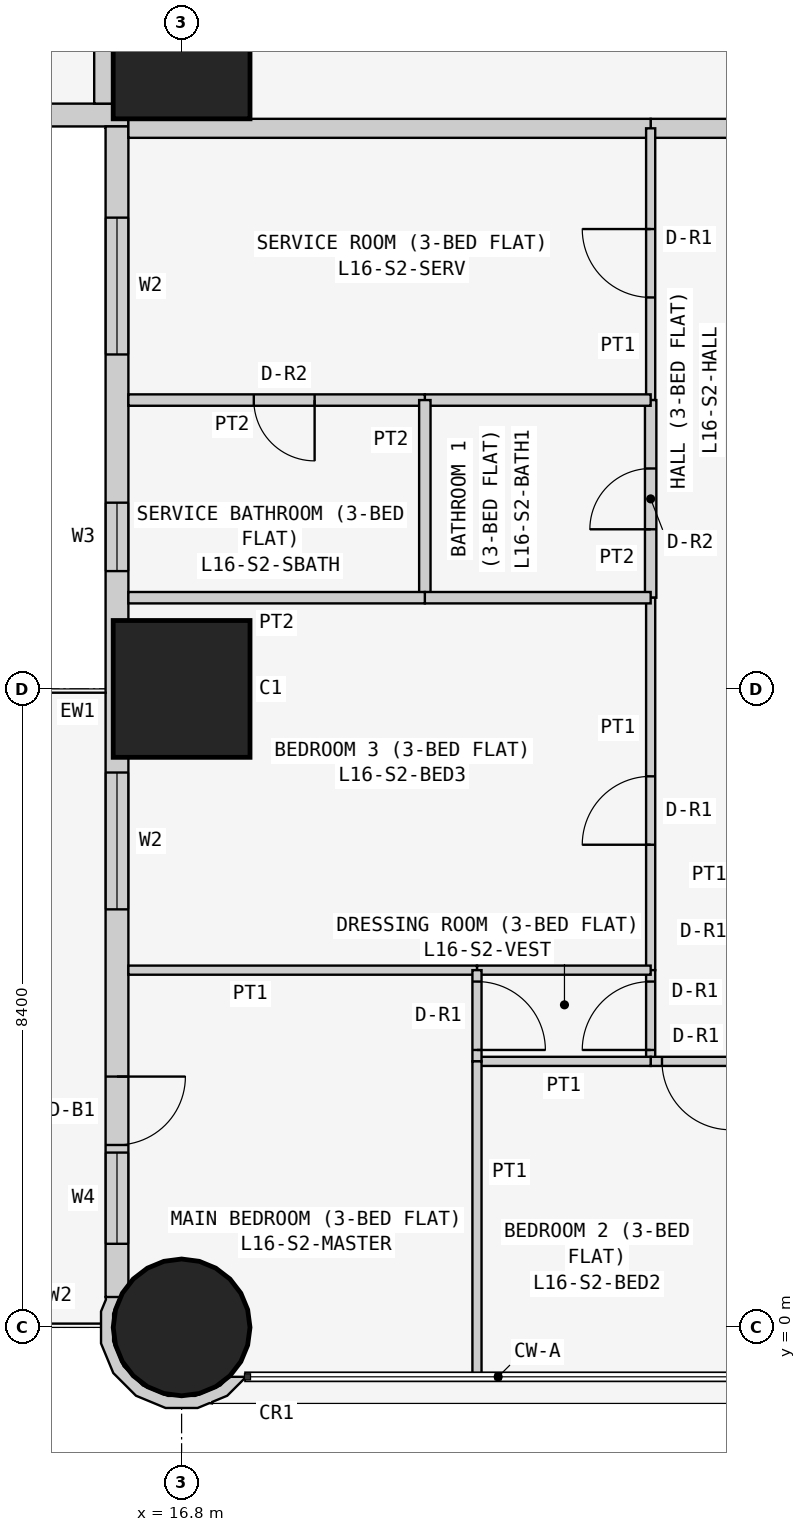
"""IFC4 building model, lengths in metres.
Left out: names, types, materials, properties, quantities, classifications, styles, units other than length and angle.
Written with IfcOpenShell. Run it as: python <this file> out.ifc"""

import sys

from ifc_helpers import new_model, si_unit, direction, frame, frame_2d, origin, origin_2d, place, context, subcontext, project, spatial, polyline, rectangle, circle, outline, extrude, element, fill, save


model = new_model("IFC4")
c1 = context("Model", 3, precision=1e-05, world=origin(), true_north=direction((0.0, 1.0)))
c2 = subcontext(c1, "Body", "Model", "MODEL_VIEW")
j1 = project(units=[si_unit("LENGTHUNIT", "METRE"), si_unit("PLANEANGLEUNIT", "RADIAN")], contexts=[c1])
p1 = place(None, origin())
s1 = spatial("IfcSite", under=j1, at=p1, CompositionType="ELEMENT")
p2 = place(p1, origin())
s2 = spatial("IfcBuilding", under=s1, at=p2, CompositionType="ELEMENT")
p3 = place(p2, frame((0.0, 0.0, 66.9)))
s3 = spatial("IfcBuildingStorey", under=s2, at=p3, CompositionType="ELEMENT", Elevation=66.9)
p4 = place(p3, frame((16.8, 0.0, 0.0), z_axis=(0.0, 0.0, 1.0), x_axis=(1.0, 0.0, 0.0)))
e1 = element("IfcColumn", 1, at=p4, inside=s3, PredefinedType="COLUMN", context=c2, shape_type="SweptSolid", body=[
    extrude(circle(Radius=0.9, at=origin_2d()), origin(), (0.0, 0.0, 1.0), 3.6),
])
for number, where, z_axis, x_axis in (
    (2, (16.8, 8.4, 0.0), (0.0, 0.0, 1.0), (1.0, 0.0, 0.0)),
    (3, (16.8, 16.8, 0.0), (0.0, 0.0, 1.0), (1.0, 0.0, 0.0)),
):
    element("IfcColumn", number, at=place(p3, frame(where, z_axis=z_axis, x_axis=x_axis)), inside=s3, PredefinedType="COLUMN", context=c2, shape_type="SweptSolid", body=[
        extrude(rectangle(XDim=1.8, YDim=1.8, at=origin_2d()), origin(), (0.0, 0.0, 1.0), 3.6),
    ])
p5 = place(p3, frame((0.4, 15.95, 0.0), z_axis=(0.0, 0.0, 1.0), x_axis=(1.0, 0.0, 0.0)))
e4 = element("IfcWall", 4, at=p5, inside=s3, PredefinedType="SOLIDWALL", context=c2, shape_type="SweptSolid", body=[
    extrude(rectangle(XDim=15.7, YDim=0.3, at=frame_2d((7.85, 0.0))), origin(), (0.0, 0.0, 1.0), 3.45),
])
p6 = place(p5, frame((12.4, 0.0, 0.9)))
e5 = element("IfcOpeningElement", 5, at=p6, cuts=e4, PredefinedType="OPENING", context=c2, shape_type="SweptSolid", body=[
    extrude(rectangle(XDim=1.8, YDim=1.5, at=frame_2d((0.9, 0.75))), frame((0.0, 0.16, 0.0), z_axis=(0.0, -1.0, 0.0), x_axis=(1.0, 0.0, 0.0)), (0.0, 0.0, 1.0), 0.32),
])
p7 = place(p5, frame((9.55, 0.0, 1.5)))
e6 = element("IfcOpeningElement", 6, at=p7, cuts=e4, PredefinedType="OPENING", context=c2, shape_type="SweptSolid", body=[
    extrude(rectangle(XDim=0.9, YDim=0.7, at=frame_2d((0.45, 0.35))), frame((0.0, 0.16, 0.0), z_axis=(0.0, -1.0, 0.0), x_axis=(1.0, 0.0, 0.0)), (0.0, 0.0, 1.0), 0.32),
])
p8 = place(p5, frame((5.1, 0.0, 0.9)))
e7 = element("IfcOpeningElement", 7, at=p8, cuts=e4, PredefinedType="OPENING", context=c2, shape_type="SweptSolid", body=[
    extrude(rectangle(XDim=1.8, YDim=1.5, at=frame_2d((0.9, 0.75))), frame((0.0, 0.16, 0.0), z_axis=(0.0, -1.0, 0.0), x_axis=(1.0, 0.0, 0.0)), (0.0, 0.0, 1.0), 0.32),
])
p9 = place(p5, frame((2.0, 0.0, 0.0)))
e8 = element("IfcOpeningElement", 8, at=p9, cuts=e4, PredefinedType="OPENING", context=c2, shape_type="SweptSolid", body=[
    extrude(rectangle(XDim=0.9, YDim=2.4, at=frame_2d((0.45, 1.2))), frame((0.0, 0.16, 0.0), z_axis=(0.0, -1.0, 0.0), x_axis=(1.0, 0.0, 0.0)), (0.0, 0.0, 1.0), 0.32),
])
p10 = place(p5, frame((0.7, 0.0, 0.9)))
e9 = element("IfcOpeningElement", 9, at=p10, cuts=e4, PredefinedType="OPENING", context=c2, shape_type="SweptSolid", body=[
    extrude(rectangle(XDim=1.2, YDim=1.5, at=frame_2d((0.6, 0.75))), frame((0.0, 0.16, 0.0), z_axis=(0.0, -1.0, 0.0), x_axis=(1.0, 0.0, 0.0)), (0.0, 0.0, 1.0), 0.32),
])
p11 = place(p3, frame((15.95, 15.8, 0.0), z_axis=(0.0, 0.0, 1.0), x_axis=(0.0, -1.0, 0.0)))
e10 = element("IfcWall", 10, at=p11, inside=s3, PredefinedType="SOLIDWALL", context=c2, shape_type="SweptSolid", body=[
    extrude(rectangle(XDim=15.4, YDim=0.3, at=frame_2d((7.7, 0.0))), origin(), (0.0, 0.0, 1.0), 3.45),
])
p12 = place(p11, frame((1.2, 0.0, 0.9)))
e11 = element("IfcOpeningElement", 11, at=p12, cuts=e10, PredefinedType="OPENING", context=c2, shape_type="SweptSolid", body=[
    extrude(rectangle(XDim=1.8, YDim=1.5, at=frame_2d((0.9, 0.75))), frame((0.0, 0.16, 0.0), z_axis=(0.0, -1.0, 0.0), x_axis=(1.0, 0.0, 0.0)), (0.0, 0.0, 1.0), 0.32),
])
p13 = place(p11, frame((4.95, 0.0, 1.5)))
e12 = element("IfcOpeningElement", 12, at=p13, cuts=e10, PredefinedType="OPENING", context=c2, shape_type="SweptSolid", body=[
    extrude(rectangle(XDim=0.9, YDim=0.7, at=frame_2d((0.45, 0.35))), frame((0.0, 0.16, 0.0), z_axis=(0.0, -1.0, 0.0), x_axis=(1.0, 0.0, 0.0)), (0.0, 0.0, 1.0), 0.32),
])
p14 = place(p11, frame((8.5, 0.0, 0.9)))
e13 = element("IfcOpeningElement", 13, at=p14, cuts=e10, PredefinedType="OPENING", context=c2, shape_type="SweptSolid", body=[
    extrude(rectangle(XDim=1.8, YDim=1.5, at=frame_2d((0.9, 0.75))), frame((0.0, 0.16, 0.0), z_axis=(0.0, -1.0, 0.0), x_axis=(1.0, 0.0, 0.0)), (0.0, 0.0, 1.0), 0.32),
])
p15 = place(p11, frame((12.5, 0.0, 0.0)))
e14 = element("IfcOpeningElement", 14, at=p15, cuts=e10, PredefinedType="OPENING", context=c2, shape_type="SweptSolid", body=[
    extrude(rectangle(XDim=0.9, YDim=2.4, at=frame_2d((0.45, 1.2))), frame((0.0, 0.16, 0.0), z_axis=(0.0, -1.0, 0.0), x_axis=(1.0, 0.0, 0.0)), (0.0, 0.0, 1.0), 0.32),
])
p16 = place(p11, frame((13.5, 0.0, 0.9)))
e15 = element("IfcOpeningElement", 15, at=p16, cuts=e10, PredefinedType="OPENING", context=c2, shape_type="SweptSolid", body=[
    extrude(rectangle(XDim=1.2, YDim=1.5, at=frame_2d((0.6, 0.75))), frame((0.0, 0.16, 0.0), z_axis=(0.0, -1.0, 0.0), x_axis=(1.0, 0.0, 0.0)), (0.0, 0.0, 1.0), 0.32),
])
p17 = place(p3, frame((15.89, 0.364, 0.0), z_axis=(0.0, 0.0, 1.0), x_axis=(-0.377204953059, -0.926129809145, 0.0)))
e16 = element("IfcWall", 16, at=p17, inside=s3, PredefinedType="SOLIDWALL", context=c2, shape_type="SweptSolid", body=[
    extrude(outline(polyline([(0.36, 1.803), (0.509, 1.741), (0.761, 1.486), (0.896, 1.154), (0.894, 0.795), (0.755, 0.465), (0.5, 0.213), (0.168, 0.078), (-0.1, 0.08), (0.001, -0.097), (0.03, -0.08), (0.199, -0.081), (0.589, 0.078), (0.889, 0.374), (1.053, 0.763), (1.055, 1.185), (0.896, 1.575), (0.778, 1.695), (0.769, 1.728), (0.75, 1.723), (0.6, 1.875), (0.295, 2.004), (0.281, 1.998), (0.36, 1.803)])), origin(), (0.0, 0.0, 1.0), 3.45),
])
p18 = place(p3, frame((24.171, 15.775, 0.0), z_axis=(0.0, 0.0, 1.0), x_axis=(-1.0, 0.0, 0.0)))
e17 = element("IfcWall", 17, at=p18, inside=s3, PredefinedType="PARTITIONING", context=c2, shape_type="SweptSolid", body=[
    extrude(rectangle(XDim=1.2, YDim=0.25, at=frame_2d((0.6, 0.0))), origin(), (0.0, 0.0, 1.0), 3.45),
])
p19 = place(p3, frame((22.971, 15.775, 0.0), z_axis=(0.0, 0.0, 1.0), x_axis=(-1.0, 0.0, 0.0)))
e18 = element("IfcWall", 18, at=p19, inside=s3, PredefinedType="PARTITIONING", context=c2, shape_type="SweptSolid", body=[
    extrude(rectangle(XDim=6.871, YDim=0.25, at=frame_2d((3.436, 0.0))), origin(), (0.0, 0.0, 1.0), 3.45),
])
p20 = place(p3, frame((15.775, 16.1, 0.0), z_axis=(0.0, 0.0, 1.0), x_axis=(0.0, 1.0, 0.0)))
e19 = element("IfcWall", 19, at=p20, inside=s3, PredefinedType="PARTITIONING", context=c2, shape_type="SweptSolid", body=[
    extrude(rectangle(XDim=6.471, YDim=0.25, at=frame_2d((3.235, 0.0))), origin(), (0.0, 0.0, 1.0), 3.45),
])
p21 = place(p3, frame((22.971, 12.2, 0.0), z_axis=(0.0, 0.0, 1.0), x_axis=(0.0, 1.0, 0.0)))
e20 = element("IfcWall", 20, at=p21, inside=s3, PredefinedType="PARTITIONING", context=c2, shape_type="SweptSolid", body=[
    extrude(rectangle(XDim=3.575, YDim=0.12, at=frame_2d((1.788, 0.0))), origin(), (0.0, 0.0, 1.0), 3.45),
])
p22 = place(p21, frame((1.35, 0.0, 0.0)))
e21 = element("IfcOpeningElement", 21, at=p22, cuts=e20, PredefinedType="OPENING", context=c2, shape_type="SweptSolid", body=[
    extrude(rectangle(XDim=0.9, YDim=2.1, at=frame_2d((0.45, 1.05))), frame((0.0, 0.07, 0.0), z_axis=(0.0, -1.0, 0.0), x_axis=(1.0, 0.0, 0.0)), (0.0, 0.0, 1.0), 0.14),
])
p23 = place(p3, frame((22.971, 9.6, 0.0), z_axis=(0.0, 0.0, 1.0), x_axis=(0.0, 1.0, 0.0)))
e22 = element("IfcWall", 22, at=p23, inside=s3, PredefinedType="PARTITIONING", context=c2, shape_type="SweptSolid", body=[
    extrude(rectangle(XDim=2.6, YDim=0.15, at=frame_2d((1.3, 0.0))), origin(), (0.0, 0.0, 1.0), 3.45),
])
p24 = place(p23, frame((0.9, 0.0, 0.0)))
e23 = element("IfcOpeningElement", 23, at=p24, cuts=e22, PredefinedType="OPENING", context=c2, shape_type="SweptSolid", body=[
    extrude(rectangle(XDim=0.8, YDim=2.1, at=frame_2d((0.4, 1.05))), frame((0.0, 0.085, 0.0), z_axis=(0.0, -1.0, 0.0), x_axis=(1.0, 0.0, 0.0)), (0.0, 0.0, 1.0), 0.17),
])
p25 = place(p3, frame((22.971, 4.7, 0.0), z_axis=(0.0, 0.0, 1.0), x_axis=(0.0, 1.0, 0.0)))
e24 = element("IfcWall", 24, at=p25, inside=s3, PredefinedType="PARTITIONING", context=c2, shape_type="SweptSolid", body=[
    extrude(rectangle(XDim=4.9, YDim=0.12, at=frame_2d((2.45, 0.0))), origin(), (0.0, 0.0, 1.0), 3.45),
])
p26 = place(p25, frame((1.65, 0.0, 0.0)))
e25 = element("IfcOpeningElement", 25, at=p26, cuts=e24, PredefinedType="OPENING", context=c2, shape_type="SweptSolid", body=[
    extrude(rectangle(XDim=0.9, YDim=2.1, at=frame_2d((0.45, 1.05))), frame((0.0, 0.07, 0.0), z_axis=(0.0, -1.0, 0.0), x_axis=(1.0, 0.0, 0.0)), (0.0, 0.0, 1.0), 0.14),
])
p27 = place(p3, frame((22.971, 3.5, 0.0), z_axis=(0.0, 0.0, 1.0), x_axis=(0.0, 1.0, 0.0)))
e26 = element("IfcWall", 26, at=p27, inside=s3, PredefinedType="PARTITIONING", context=c2, shape_type="SweptSolid", body=[
    extrude(rectangle(XDim=1.2, YDim=0.12, at=frame_2d((0.6, 0.0))), origin(), (0.0, 0.0, 1.0), 3.45),
])
p28 = place(p27, frame((0.15, 0.0, 0.0)))
e27 = element("IfcOpeningElement", 27, at=p28, cuts=e26, PredefinedType="OPENING", context=c2, shape_type="SweptSolid", body=[
    extrude(rectangle(XDim=0.9, YDim=2.1, at=frame_2d((0.45, 1.05))), frame((0.0, 0.07, 0.0), z_axis=(0.0, -1.0, 0.0), x_axis=(1.0, 0.0, 0.0)), (0.0, 0.0, 1.0), 0.14),
])
p29 = place(p3, frame((24.171, 3.5, 0.0), z_axis=(0.0, 0.0, 1.0), x_axis=(-1.0, 0.0, 0.0)))
e28 = element("IfcWall", 28, at=p29, inside=s3, PredefinedType="PARTITIONING", context=c2, shape_type="SweptSolid", body=[
    extrude(rectangle(XDim=1.2, YDim=0.12, at=frame_2d((0.6, 0.0))), origin(), (0.0, 0.0, 1.0), 3.45),
])
p30 = place(p29, frame((0.151, 0.0, 0.0)))
e29 = element("IfcOpeningElement", 29, at=p30, cuts=e28, PredefinedType="OPENING", context=c2, shape_type="SweptSolid", body=[
    extrude(rectangle(XDim=0.9, YDim=2.1, at=frame_2d((0.45, 1.05))), frame((0.0, 0.07, 0.0), z_axis=(0.0, -1.0, 0.0), x_axis=(1.0, 0.0, 0.0)), (0.0, 0.0, 1.0), 0.14),
])
p31 = place(p3, frame((22.971, 12.2, 0.0), z_axis=(0.0, 0.0, 1.0), x_axis=(-1.0, 0.0, 0.0)))
e30 = element("IfcWall", 30, at=p31, inside=s3, PredefinedType="PARTITIONING", context=c2, shape_type="SweptSolid", body=[
    extrude(rectangle(XDim=2.971, YDim=0.15, at=frame_2d((1.485, 0.0))), origin(), (0.0, 0.0, 1.0), 3.45),
])
p32 = place(p3, frame((20.0, 12.2, 0.0), z_axis=(0.0, 0.0, 1.0), x_axis=(-1.0, 0.0, 0.0)))
e31 = element("IfcWall", 31, at=p32, inside=s3, PredefinedType="PARTITIONING", context=c2, shape_type="SweptSolid", body=[
    extrude(rectangle(XDim=3.9, YDim=0.15, at=frame_2d((1.95, 0.0))), origin(), (0.0, 0.0, 1.0), 3.45),
])
p33 = place(p32, frame((1.45, 0.0, 0.0)))
e32 = element("IfcOpeningElement", 32, at=p33, cuts=e31, PredefinedType="OPENING", context=c2, shape_type="SweptSolid", body=[
    extrude(rectangle(XDim=0.8, YDim=2.1, at=frame_2d((0.4, 1.05))), frame((0.0, 0.085, 0.0), z_axis=(0.0, -1.0, 0.0), x_axis=(1.0, 0.0, 0.0)), (0.0, 0.0, 1.0), 0.17),
])
p34 = place(p3, frame((20.0, 9.6, 0.0), z_axis=(0.0, 0.0, 1.0), x_axis=(0.0, 1.0, 0.0)))
e33 = element("IfcWall", 33, at=p34, inside=s3, PredefinedType="PARTITIONING", context=c2, shape_type="SweptSolid", body=[
    extrude(rectangle(XDim=2.6, YDim=0.15, at=frame_2d((1.3, 0.0))), origin(), (0.0, 0.0, 1.0), 3.45),
])
p35 = place(p3, frame((22.971, 9.6, 0.0), z_axis=(0.0, 0.0, 1.0), x_axis=(-1.0, 0.0, 0.0)))
e34 = element("IfcWall", 34, at=p35, inside=s3, PredefinedType="PARTITIONING", context=c2, shape_type="SweptSolid", body=[
    extrude(rectangle(XDim=2.971, YDim=0.15, at=frame_2d((1.485, 0.0))), origin(), (0.0, 0.0, 1.0), 3.45),
])
p36 = place(p3, frame((20.0, 9.6, 0.0), z_axis=(0.0, 0.0, 1.0), x_axis=(-1.0, 0.0, 0.0)))
e35 = element("IfcWall", 35, at=p36, inside=s3, PredefinedType="PARTITIONING", context=c2, shape_type="SweptSolid", body=[
    extrude(rectangle(XDim=3.9, YDim=0.15, at=frame_2d((1.95, 0.0))), origin(), (0.0, 0.0, 1.0), 3.45),
])
p37 = place(p3, frame((22.971, 4.7, 0.0), z_axis=(0.0, 0.0, 1.0), x_axis=(-1.0, 0.0, 0.0)))
e36 = element("IfcWall", 36, at=p37, inside=s3, PredefinedType="PARTITIONING", context=c2, shape_type="SweptSolid", body=[
    extrude(rectangle(XDim=2.285, YDim=0.12, at=frame_2d((1.143, 0.0))), origin(), (0.0, 0.0, 1.0), 3.45),
])
p38 = place(p3, frame((20.686, 4.7, 0.0), z_axis=(0.0, 0.0, 1.0), x_axis=(-1.0, 0.0, 0.0)))
e37 = element("IfcWall", 37, at=p38, inside=s3, PredefinedType="PARTITIONING", context=c2, shape_type="SweptSolid", body=[
    extrude(rectangle(XDim=4.586, YDim=0.12, at=frame_2d((2.293, 0.0))), origin(), (0.0, 0.0, 1.0), 3.45),
])
p39 = place(p3, frame((22.971, 3.5, 0.0), z_axis=(0.0, 0.0, 1.0), x_axis=(-1.0, 0.0, 0.0)))
e38 = element("IfcWall", 38, at=p39, inside=s3, PredefinedType="PARTITIONING", context=c2, shape_type="SweptSolid", body=[
    extrude(rectangle(XDim=2.285, YDim=0.12, at=frame_2d((1.143, 0.0))), origin(), (0.0, 0.0, 1.0), 3.45),
])
p40 = place(p3, frame((20.686, 3.5, 0.0), z_axis=(0.0, 0.0, 1.0), x_axis=(0.0, 1.0, 0.0)))
e39 = element("IfcWall", 39, at=p40, inside=s3, PredefinedType="PARTITIONING", context=c2, shape_type="SweptSolid", body=[
    extrude(rectangle(XDim=1.2, YDim=0.12, at=frame_2d((0.6, 0.0))), origin(), (0.0, 0.0, 1.0), 3.45),
])
p41 = place(p40, frame((0.15, 0.0, 0.0)))
e40 = element("IfcOpeningElement", 40, at=p41, cuts=e39, PredefinedType="OPENING", context=c2, shape_type="SweptSolid", body=[
    extrude(rectangle(XDim=0.9, YDim=2.1, at=frame_2d((0.45, 1.05))), frame((0.0, 0.07, 0.0), z_axis=(0.0, -1.0, 0.0), x_axis=(1.0, 0.0, 0.0)), (0.0, 0.0, 1.0), 0.14),
])
p42 = place(p3, frame((20.686, -0.65, 0.0), z_axis=(0.0, 0.0, 1.0), x_axis=(0.0, 1.0, 0.0)))
e41 = element("IfcWall", 41, at=p42, inside=s3, PredefinedType="PARTITIONING", context=c2, shape_type="SweptSolid", body=[
    extrude(rectangle(XDim=4.15, YDim=0.12, at=frame_2d((2.075, 0.0))), origin(), (0.0, 0.0, 1.0), 3.45),
])
p43 = place(p12, origin())
e42 = element("IfcWindow", 42, at=p43, inside=s3, PartitioningType="SINGLE_PANEL", PredefinedType="WINDOW", context=c2, shape_type="SweptSolid", body=[
    extrude(rectangle(XDim=1.8, YDim=1.5, at=frame_2d((0.9, 0.75))), frame((0.0, 0.03, 0.0), z_axis=(0.0, -1.0, 0.0), x_axis=(1.0, 0.0, 0.0)), (0.0, 0.0, 1.0), 0.06),
])
fill(e11, e42)
p44 = place(p13, origin())
e43 = element("IfcWindow", 43, at=p44, inside=s3, PartitioningType="SINGLE_PANEL", PredefinedType="WINDOW", context=c2, shape_type="SweptSolid", body=[
    extrude(rectangle(XDim=0.9, YDim=0.7, at=frame_2d((0.45, 0.35))), frame((0.0, 0.03, 0.0), z_axis=(0.0, -1.0, 0.0), x_axis=(1.0, 0.0, 0.0)), (0.0, 0.0, 1.0), 0.06),
])
fill(e12, e43)
p45 = place(p14, origin())
e44 = element("IfcWindow", 44, at=p45, inside=s3, PartitioningType="SINGLE_PANEL", PredefinedType="WINDOW", context=c2, shape_type="SweptSolid", body=[
    extrude(rectangle(XDim=1.8, YDim=1.5, at=frame_2d((0.9, 0.75))), frame((0.0, 0.03, 0.0), z_axis=(0.0, -1.0, 0.0), x_axis=(1.0, 0.0, 0.0)), (0.0, 0.0, 1.0), 0.06),
])
fill(e13, e44)
p46 = place(p15, origin())
e45 = element("IfcDoor", 45, at=p46, inside=s3, OperationType="SINGLE_SWING_LEFT", PredefinedType="DOOR", context=c2, shape_type="SweptSolid", body=[
    extrude(rectangle(XDim=0.9, YDim=2.4, at=frame_2d((0.45, 1.2))), frame((0.0, 0.025, 0.0), z_axis=(0.0, -1.0, 0.0), x_axis=(1.0, 0.0, 0.0)), (0.0, 0.0, 1.0), 0.05),
])
fill(e14, e45)
p47 = place(p16, origin())
e46 = element("IfcWindow", 46, at=p47, inside=s3, PartitioningType="SINGLE_PANEL", PredefinedType="WINDOW", context=c2, shape_type="SweptSolid", body=[
    extrude(rectangle(XDim=1.2, YDim=1.5, at=frame_2d((0.6, 0.75))), frame((0.0, 0.03, 0.0), z_axis=(0.0, -1.0, 0.0), x_axis=(1.0, 0.0, 0.0)), (0.0, 0.0, 1.0), 0.06),
])
fill(e15, e46)
p48 = place(p22, origin())
e47 = element("IfcDoor", 47, at=p48, inside=s3, OperationType="SINGLE_SWING_RIGHT", PredefinedType="DOOR", context=c2, shape_type="SweptSolid", body=[
    extrude(rectangle(XDim=0.9, YDim=2.1, at=frame_2d((0.45, 1.05))), frame((0.0, 0.025, 0.0), z_axis=(0.0, -1.0, 0.0), x_axis=(1.0, 0.0, 0.0)), (0.0, 0.0, 1.0), 0.05),
])
fill(e21, e47)
p49 = place(p33, origin())
e48 = element("IfcDoor", 48, at=p49, inside=s3, OperationType="SINGLE_SWING_LEFT", PredefinedType="DOOR", context=c2, shape_type="SweptSolid", body=[
    extrude(rectangle(XDim=0.8, YDim=2.1, at=frame_2d((0.4, 1.05))), frame((0.0, 0.025, 0.0), z_axis=(0.0, -1.0, 0.0), x_axis=(1.0, 0.0, 0.0)), (0.0, 0.0, 1.0), 0.05),
])
fill(e32, e48)
p50 = place(p24, origin())
e49 = element("IfcDoor", 49, at=p50, inside=s3, OperationType="SINGLE_SWING_LEFT", PredefinedType="DOOR", context=c2, shape_type="SweptSolid", body=[
    extrude(rectangle(XDim=0.8, YDim=2.1, at=frame_2d((0.4, 1.05))), frame((0.0, 0.025, 0.0), z_axis=(0.0, -1.0, 0.0), x_axis=(1.0, 0.0, 0.0)), (0.0, 0.0, 1.0), 0.05),
])
fill(e23, e49)
p51 = place(p26, origin())
e50 = element("IfcDoor", 50, at=p51, inside=s3, OperationType="SINGLE_SWING_LEFT", PredefinedType="DOOR", context=c2, shape_type="SweptSolid", body=[
    extrude(rectangle(XDim=0.9, YDim=2.1, at=frame_2d((0.45, 1.05))), frame((0.0, 0.025, 0.0), z_axis=(0.0, -1.0, 0.0), x_axis=(1.0, 0.0, 0.0)), (0.0, 0.0, 1.0), 0.05),
])
fill(e25, e50)
p52 = place(p28, origin())
e51 = element("IfcDoor", 51, at=p52, inside=s3, OperationType="SINGLE_SWING_LEFT", PredefinedType="DOOR", context=c2, shape_type="SweptSolid", body=[
    extrude(rectangle(XDim=0.9, YDim=2.1, at=frame_2d((0.45, 1.05))), frame((0.0, 0.025, 0.0), z_axis=(0.0, -1.0, 0.0), x_axis=(1.0, 0.0, 0.0)), (0.0, 0.0, 1.0), 0.05),
])
fill(e27, e51)
p53 = place(p41, frame((0.9, 0.0, 0.0), z_axis=(0.0, 0.0, 1.0), x_axis=(-1.0, 0.0, 0.0)))
e52 = element("IfcDoor", 52, at=p53, inside=s3, OperationType="SINGLE_SWING_RIGHT", PredefinedType="DOOR", context=c2, shape_type="SweptSolid", body=[
    extrude(rectangle(XDim=0.9, YDim=2.1, at=frame_2d((0.45, 1.05))), frame((0.0, 0.025, 0.0), z_axis=(0.0, -1.0, 0.0), x_axis=(1.0, 0.0, 0.0)), (0.0, 0.0, 1.0), 0.05),
])
fill(e40, e52)
p54 = place(p30, origin())
e53 = element("IfcDoor", 53, at=p54, inside=s3, OperationType="SINGLE_SWING_LEFT", PredefinedType="DOOR", context=c2, shape_type="SweptSolid", body=[
    extrude(rectangle(XDim=0.9, YDim=2.1, at=frame_2d((0.45, 1.05))), frame((0.0, 0.025, 0.0), z_axis=(0.0, -1.0, 0.0), x_axis=(1.0, 0.0, 0.0)), (0.0, 0.0, 1.0), 0.05),
])
fill(e29, e53)
save(model, sys.argv[1])
